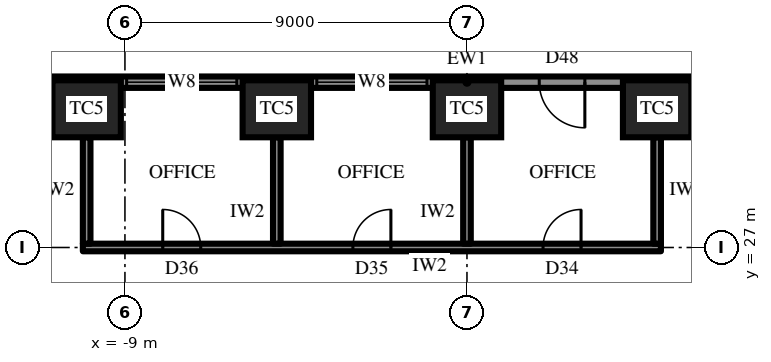
"""IFC4 building model, lengths in metres.
Left out: names, types, materials, properties, quantities, classifications, styles, units other than length and angle.
Written with IfcOpenShell. Run it as: python <this file> out.ifc"""

import sys

from ifc_helpers import new_model, si_unit, direction, frame, frame_2d, origin, origin_2d, place, context, subcontext, project, spatial, rectangle, extrude, element, fill, save


model = new_model("IFC4")
c1 = context("Model", 3, precision=1e-05, world=origin(), true_north=direction((0.0, 1.0)))
c2 = subcontext(c1, "Body", "Model", "MODEL_VIEW")
j1 = project(units=[si_unit("LENGTHUNIT", "METRE"), si_unit("PLANEANGLEUNIT", "RADIAN")], contexts=[c1])
p1 = place(None, origin())
s1 = spatial("IfcSite", under=j1, at=p1, CompositionType="ELEMENT")
p2 = place(p1, origin())
s2 = spatial("IfcBuilding", under=s1, at=p2, CompositionType="ELEMENT")
p3 = place(p2, frame((0.0, 0.0, 132.1)))
s3 = spatial("IfcBuildingStorey", under=s2, at=p3, CompositionType="ELEMENT", Elevation=132.1)
for number, where, z_axis, x_axis in (
    (1, (5.004, 30.65, 0.0), (0.0, 0.0, 1.0), (-1.0, 0.0, 0.0)),
    (2, (0.0, 30.65, 0.0), (0.0, 0.0, 1.0), (-1.0, 0.0, 0.0)),
    (3, (-5.004, 30.65, 0.0), (0.0, 0.0, 1.0), (-1.0, 0.0, 0.0)),
    (4, (-10.007, 30.65, 0.0), (0.0, 0.0, 1.0), (-1.0, 0.0, 0.0)),
):
    element("IfcColumn", number, at=place(p3, frame(where, z_axis=z_axis, x_axis=x_axis)), inside=s3, PredefinedType="COLUMN", context=c2, shape_type="SweptSolid", body=[
        extrude(rectangle(XDim=1.8, YDim=1.5, at=origin_2d()), origin(), (0.0, 0.0, 1.0), 4.2),
    ])
p4 = place(p3, frame((15.011, 31.35, 0.0), z_axis=(0.0, 0.0, 1.0), x_axis=(-1.0, 0.0, 0.0)))
e5 = element("IfcWall", 5, at=p4, inside=s3, PredefinedType="SOLIDWALL", context=c2, shape_type="SweptSolid", body=[
    extrude(rectangle(XDim=30.022, YDim=0.3, at=frame_2d((15.011, 0.0))), origin(), (0.0, 0.0, 1.0), 2.3),
])
p5 = place(p4, frame((1.052, 0.0, 0.6)))
e6 = element("IfcOpeningElement", 6, at=p5, cuts=e5, PredefinedType="OPENING", context=c2, shape_type="SweptSolid", body=[
    extrude(rectangle(XDim=2.9, YDim=1.45, at=frame_2d((1.45, 0.725))), frame((0.0, 0.16, 0.0), z_axis=(0.0, -1.0, 0.0), x_axis=(1.0, 0.0, 0.0)), (0.0, 0.0, 1.0), 0.32),
])
p6 = place(p4, frame((6.056, 0.0, 0.6)))
e7 = element("IfcOpeningElement", 7, at=p6, cuts=e5, PredefinedType="OPENING", context=c2, shape_type="SweptSolid", body=[
    extrude(rectangle(XDim=2.9, YDim=1.45, at=frame_2d((1.45, 0.725))), frame((0.0, 0.16, 0.0), z_axis=(0.0, -1.0, 0.0), x_axis=(1.0, 0.0, 0.0)), (0.0, 0.0, 1.0), 0.32),
])
p7 = place(p4, frame((11.909, 0.0, 0.0)))
e8 = element("IfcOpeningElement", 8, at=p7, cuts=e5, PredefinedType="OPENING", context=c2, shape_type="SweptSolid", body=[
    extrude(rectangle(XDim=1.2, YDim=2.2, at=frame_2d((0.6, 1.1))), frame((0.0, 0.16, 0.0), z_axis=(0.0, -1.0, 0.0), x_axis=(1.0, 0.0, 0.0)), (0.0, 0.0, 1.0), 0.32),
])
p8 = place(p4, frame((16.063, 0.0, 0.6)))
e9 = element("IfcOpeningElement", 9, at=p8, cuts=e5, PredefinedType="OPENING", context=c2, shape_type="SweptSolid", body=[
    extrude(rectangle(XDim=2.9, YDim=1.45, at=frame_2d((1.45, 0.725))), frame((0.0, 0.16, 0.0), z_axis=(0.0, -1.0, 0.0), x_axis=(1.0, 0.0, 0.0)), (0.0, 0.0, 1.0), 0.32),
])
p9 = place(p4, frame((21.067, 0.0, 0.6)))
e10 = element("IfcOpeningElement", 10, at=p9, cuts=e5, PredefinedType="OPENING", context=c2, shape_type="SweptSolid", body=[
    extrude(rectangle(XDim=2.9, YDim=1.45, at=frame_2d((1.45, 0.725))), frame((0.0, 0.16, 0.0), z_axis=(0.0, -1.0, 0.0), x_axis=(1.0, 0.0, 0.0)), (0.0, 0.0, 1.0), 0.32),
])
p10 = place(p4, frame((26.07, 0.0, 0.6)))
e11 = element("IfcOpeningElement", 11, at=p10, cuts=e5, PredefinedType="OPENING", context=c2, shape_type="SweptSolid", body=[
    extrude(rectangle(XDim=2.9, YDim=1.45, at=frame_2d((1.45, 0.725))), frame((0.0, 0.16, 0.0), z_axis=(0.0, -1.0, 0.0), x_axis=(1.0, 0.0, 0.0)), (0.0, 0.0, 1.0), 0.32),
])
p11 = place(p3, frame((5.104, 27.0, 0.0), z_axis=(0.0, 0.0, 1.0), x_axis=(-1.0, 0.0, 0.0)))
e12 = element("IfcWall", 12, at=p11, inside=s3, PredefinedType="PARTITIONING", context=c2, shape_type="SweptSolid", body=[
    extrude(rectangle(XDim=15.211, YDim=0.2, at=frame_2d((7.605, 0.0))), origin(), (0.0, 0.0, 1.0), 4.0),
])
p12 = place(p11, frame((2.102, 0.0, 0.0)))
e13 = element("IfcOpeningElement", 13, at=p12, cuts=e12, PredefinedType="OPENING", context=c2, shape_type="SweptSolid", body=[
    extrude(rectangle(XDim=1.0, YDim=2.2, at=frame_2d((0.5, 1.1))), frame((0.0, 0.11, 0.0), z_axis=(0.0, -1.0, 0.0), x_axis=(1.0, 0.0, 0.0)), (0.0, 0.0, 1.0), 0.22),
])
p13 = place(p11, frame((7.105, 0.0, 0.0)))
e14 = element("IfcOpeningElement", 14, at=p13, cuts=e12, PredefinedType="OPENING", context=c2, shape_type="SweptSolid", body=[
    extrude(rectangle(XDim=1.0, YDim=2.2, at=frame_2d((0.5, 1.1))), frame((0.0, 0.11, 0.0), z_axis=(0.0, -1.0, 0.0), x_axis=(1.0, 0.0, 0.0)), (0.0, 0.0, 1.0), 0.22),
])
p14 = place(p11, frame((12.109, 0.0, 0.0)))
e15 = element("IfcOpeningElement", 15, at=p14, cuts=e12, PredefinedType="OPENING", context=c2, shape_type="SweptSolid", body=[
    extrude(rectangle(XDim=1.0, YDim=2.2, at=frame_2d((0.5, 1.1))), frame((0.0, 0.11, 0.0), z_axis=(0.0, -1.0, 0.0), x_axis=(1.0, 0.0, 0.0)), (0.0, 0.0, 1.0), 0.22),
])
for number, where, z_axis, x_axis in (
    (16, (5.004, 27.1, 0.0), (0.0, 0.0, 1.0), (0.0, 1.0, 0.0)),
    (17, (0.0, 27.1, 0.0), (0.0, 0.0, 1.0), (0.0, 1.0, 0.0)),
    (18, (-5.004, 27.1, 0.0), (0.0, 0.0, 1.0), (0.0, 1.0, 0.0)),
    (19, (-10.007, 27.1, 0.0), (0.0, 0.0, 1.0), (0.0, 1.0, 0.0)),
):
    element("IfcWall", number, at=place(p3, frame(where, z_axis=z_axis, x_axis=x_axis)), inside=s3, PredefinedType="PARTITIONING", context=c2, shape_type="SweptSolid", body=[
        extrude(rectangle(XDim=2.8, YDim=0.2, at=frame_2d((1.4, 0.0))), origin(), (0.0, 0.0, 1.0), 2.992),
    ])
p15 = place(p7, origin())
e20 = element("IfcDoor", 20, at=p15, inside=s3, OperationType="SINGLE_SWING_RIGHT", PredefinedType="DOOR", context=c2, shape_type="SweptSolid", body=[
    extrude(rectangle(XDim=1.2, YDim=2.2, at=frame_2d((0.6, 1.1))), frame((0.0, 0.025, 0.0), z_axis=(0.0, -1.0, 0.0), x_axis=(1.0, 0.0, 0.0)), (0.0, 0.0, 1.0), 0.05),
])
fill(e8, e20)
p16 = place(p8, origin())
e21 = element("IfcWindow", 21, at=p16, inside=s3, PartitioningType="SINGLE_PANEL", PredefinedType="WINDOW", context=c2, shape_type="SweptSolid", body=[
    extrude(rectangle(XDim=2.9, YDim=1.45, at=frame_2d((1.45, 0.725))), frame((0.0, 0.03, 0.0), z_axis=(0.0, -1.0, 0.0), x_axis=(1.0, 0.0, 0.0)), (0.0, 0.0, 1.0), 0.06),
])
fill(e9, e21)
p17 = place(p9, origin())
e22 = element("IfcWindow", 22, at=p17, inside=s3, PartitioningType="SINGLE_PANEL", PredefinedType="WINDOW", context=c2, shape_type="SweptSolid", body=[
    extrude(rectangle(XDim=2.9, YDim=1.45, at=frame_2d((1.45, 0.725))), frame((0.0, 0.03, 0.0), z_axis=(0.0, -1.0, 0.0), x_axis=(1.0, 0.0, 0.0)), (0.0, 0.0, 1.0), 0.06),
])
fill(e10, e22)
p18 = place(p12, frame((1.0, 0.0, 0.0), z_axis=(0.0, 0.0, 1.0), x_axis=(-1.0, 0.0, 0.0)))
e23 = element("IfcDoor", 23, at=p18, inside=s3, OperationType="SINGLE_SWING_LEFT", PredefinedType="DOOR", context=c2, shape_type="SweptSolid", body=[
    extrude(rectangle(XDim=1.0, YDim=2.2, at=frame_2d((0.5, 1.1))), frame((0.0, 0.025, 0.0), z_axis=(0.0, -1.0, 0.0), x_axis=(1.0, 0.0, 0.0)), (0.0, 0.0, 1.0), 0.05),
])
fill(e13, e23)
p19 = place(p13, frame((1.0, 0.0, 0.0), z_axis=(0.0, 0.0, 1.0), x_axis=(-1.0, 0.0, 0.0)))
e24 = element("IfcDoor", 24, at=p19, inside=s3, OperationType="SINGLE_SWING_LEFT", PredefinedType="DOOR", context=c2, shape_type="SweptSolid", body=[
    extrude(rectangle(XDim=1.0, YDim=2.2, at=frame_2d((0.5, 1.1))), frame((0.0, 0.025, 0.0), z_axis=(0.0, -1.0, 0.0), x_axis=(1.0, 0.0, 0.0)), (0.0, 0.0, 1.0), 0.05),
])
fill(e14, e24)
p20 = place(p14, frame((1.0, 0.0, 0.0), z_axis=(0.0, 0.0, 1.0), x_axis=(-1.0, 0.0, 0.0)))
e25 = element("IfcDoor", 25, at=p20, inside=s3, OperationType="SINGLE_SWING_RIGHT", PredefinedType="DOOR", context=c2, shape_type="SweptSolid", body=[
    extrude(rectangle(XDim=1.0, YDim=2.2, at=frame_2d((0.5, 1.1))), frame((0.0, 0.025, 0.0), z_axis=(0.0, -1.0, 0.0), x_axis=(1.0, 0.0, 0.0)), (0.0, 0.0, 1.0), 0.05),
])
fill(e15, e25)
save(model, sys.argv[1])
